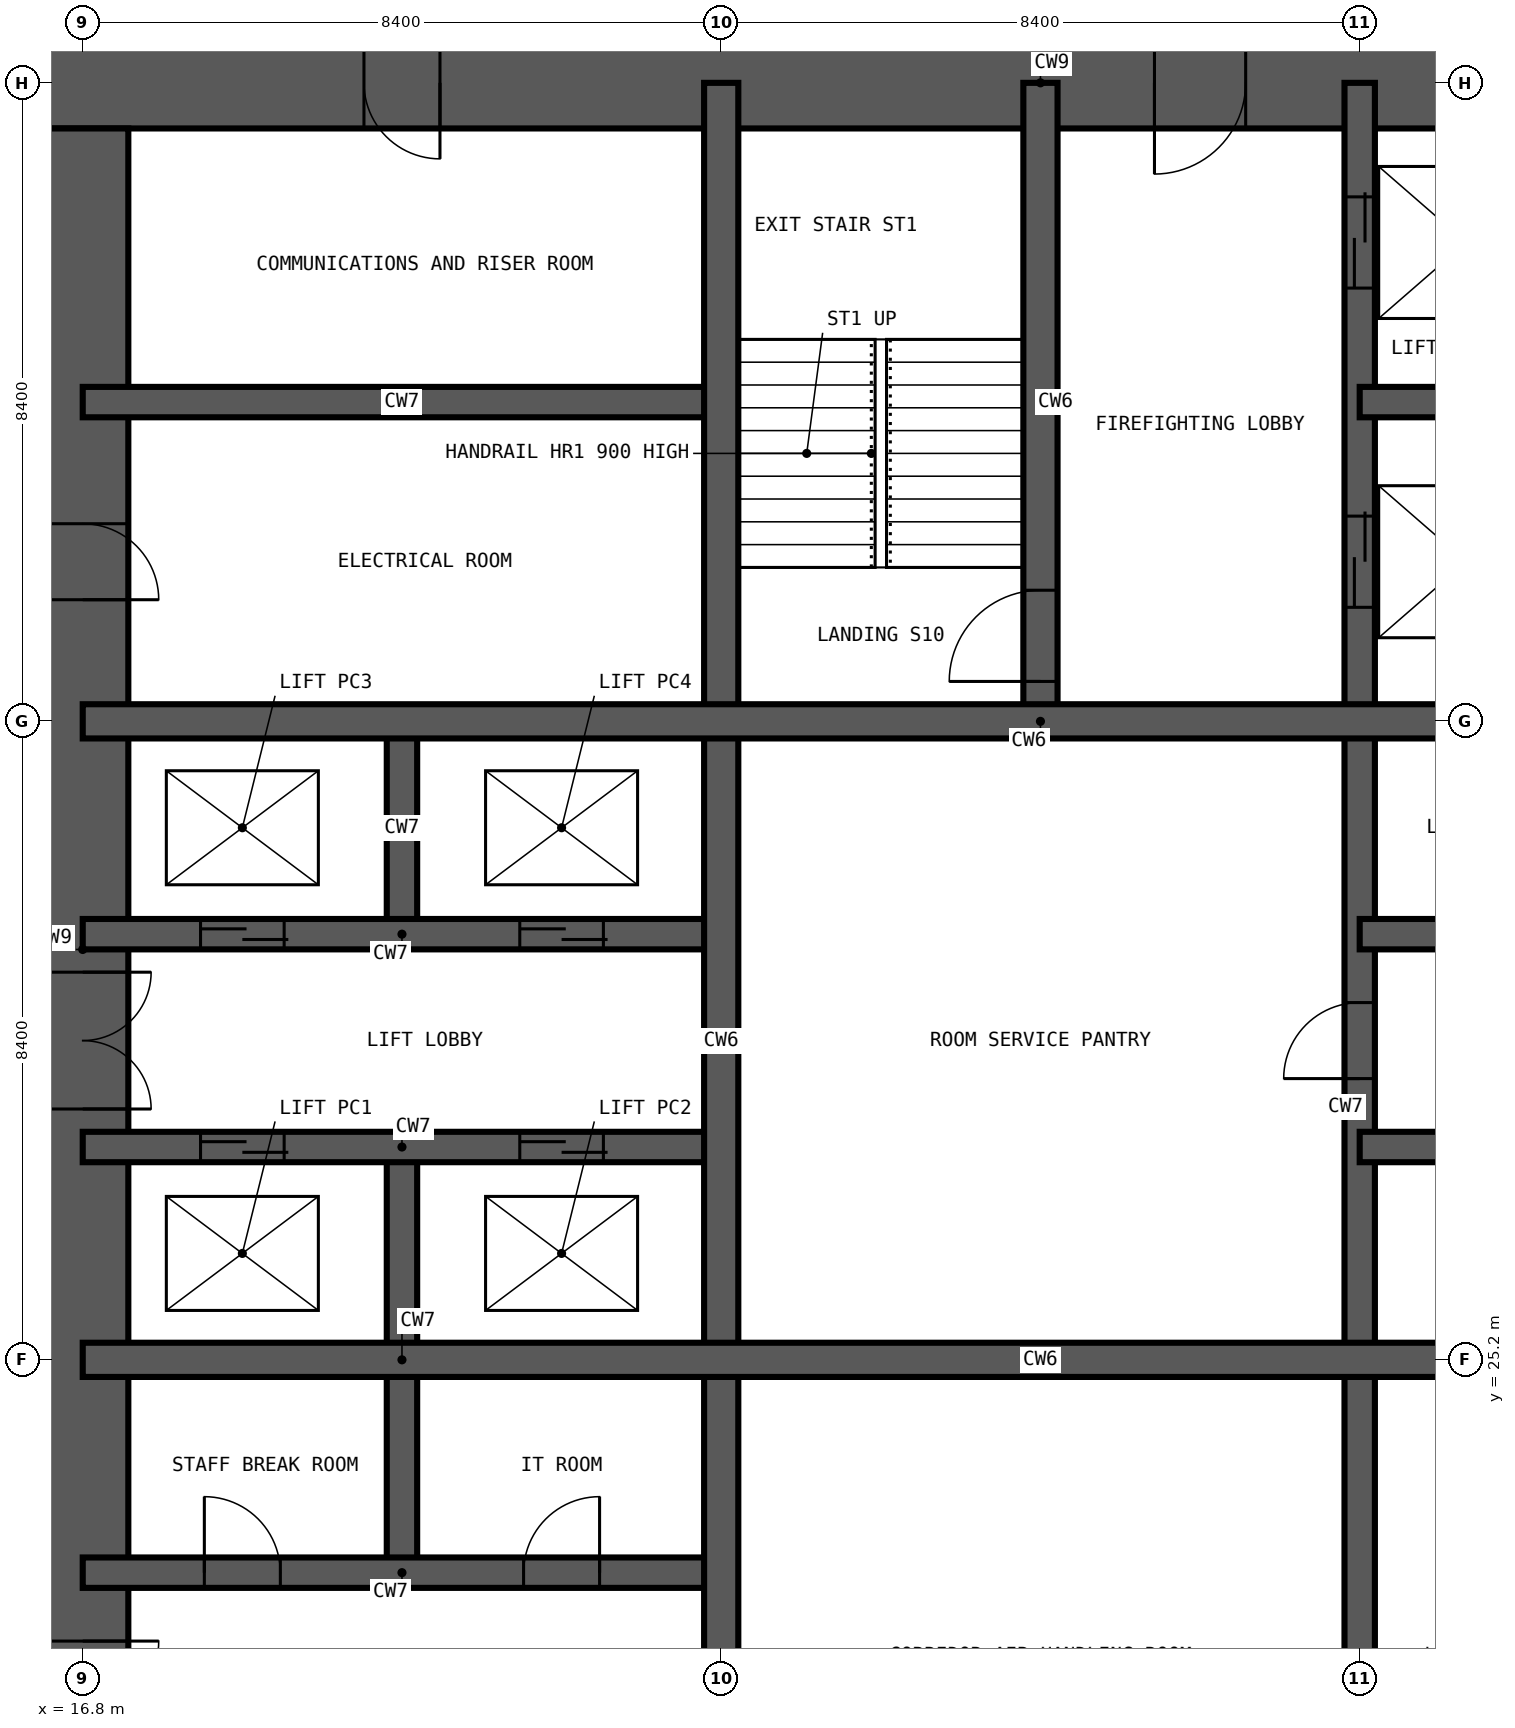
"""IFC4 building model, lengths in metres.
Left out: names, types, materials, properties, quantities, classifications, styles, units other than length and angle.
Written with IfcOpenShell. Run it as: python <this file> out.ifc"""

import sys

from ifc_helpers import new_model, si_unit, direction, frame, frame_2d, origin, place, context, subcontext, project, spatial, rectangle, extrude, element, fill, save


model = new_model("IFC4")
c1 = context("Model", 3, precision=1e-05, world=origin(), true_north=direction((0.0, 1.0)))
c2 = subcontext(c1, "Body", "Model", "MODEL_VIEW")
j1 = project(units=[si_unit("LENGTHUNIT", "METRE"), si_unit("PLANEANGLEUNIT", "RADIAN")], contexts=[c1])
p1 = place(None, origin())
s1 = spatial("IfcSite", under=j1, at=p1, CompositionType="ELEMENT")
p2 = place(p1, origin())
s2 = spatial("IfcBuilding", under=s1, at=p2, CompositionType="ELEMENT")
p3 = place(p2, frame((0.0, 0.0, 216.6)))
s3 = spatial("IfcBuildingStorey", under=s2, at=p3, CompositionType="ELEMENT", Elevation=216.6)
p4 = place(p3, frame((42.6, 42.0, -0.35), z_axis=(0.0, 0.0, 1.0), x_axis=(-1.0, 0.0, 0.0)))
e1 = element("IfcWall", 1, at=p4, inside=s3, PredefinedType="SHEAR", context=c2, shape_type="SweptSolid", body=[
    extrude(rectangle(XDim=26.4, YDim=1.2, at=frame_2d((13.2, 0.0))), origin(), (0.0, 0.0, 1.0), 3.55),
])
p5 = place(p4, frame((21.1, 0.0, 0.35)))
e2 = element("IfcOpeningElement", 2, at=p5, cuts=e1, PredefinedType="OPENING", context=c2, shape_type="SweptSolid", body=[
    extrude(rectangle(XDim=1.0, YDim=2.1, at=frame_2d((0.5, 1.05))), frame((0.0, 0.61, 0.0), z_axis=(0.0, -1.0, 0.0), x_axis=(1.0, 0.0, 0.0)), (0.0, 0.0, 1.0), 1.22),
])
p6 = place(p4, frame((10.5, 0.0, 0.35)))
e3 = element("IfcOpeningElement", 3, at=p6, cuts=e1, PredefinedType="OPENING", context=c2, shape_type="SweptSolid", body=[
    extrude(rectangle(XDim=1.2, YDim=2.2, at=frame_2d((0.6, 1.1))), frame((0.0, 0.61, 0.0), z_axis=(0.0, -1.0, 0.0), x_axis=(1.0, 0.0, 0.0)), (0.0, 0.0, 1.0), 1.22),
])
p7 = place(p3, frame((16.8, 41.4, -0.35), z_axis=(0.0, 0.0, 1.0), x_axis=(0.0, -1.0, 0.0)))
e4 = element("IfcWall", 4, at=p7, inside=s3, PredefinedType="SHEAR", context=c2, shape_type="SweptSolid", body=[
    extrude(rectangle(XDim=24.0, YDim=1.2, at=frame_2d((12.0, 0.0))), origin(), (0.0, 0.0, 1.0), 3.55),
])
p8 = place(p7, frame((11.1, 0.0, 0.35)))
e5 = element("IfcOpeningElement", 5, at=p8, cuts=e4, PredefinedType="OPENING", context=c2, shape_type="SweptSolid", body=[
    extrude(rectangle(XDim=1.8, YDim=2.2, at=frame_2d((0.9, 1.1))), frame((0.0, 0.61, 0.0), z_axis=(0.0, -1.0, 0.0), x_axis=(1.0, 0.0, 0.0)), (0.0, 0.0, 1.0), 1.22),
])
p9 = place(p7, frame((19.9, 0.0, 0.35)))
e6 = element("IfcOpeningElement", 6, at=p9, cuts=e4, PredefinedType="OPENING", context=c2, shape_type="SweptSolid", body=[
    extrude(rectangle(XDim=1.0, YDim=2.1, at=frame_2d((0.5, 1.05))), frame((0.0, 0.61, 0.0), z_axis=(0.0, -1.0, 0.0), x_axis=(1.0, 0.0, 0.0)), (0.0, 0.0, 1.0), 1.22),
])
p10 = place(p7, frame((5.2, 0.0, 0.35)))
e7 = element("IfcOpeningElement", 7, at=p10, cuts=e4, PredefinedType="OPENING", context=c2, shape_type="SweptSolid", body=[
    extrude(rectangle(XDim=1.0, YDim=2.1, at=frame_2d((0.5, 1.05))), frame((0.0, 0.61, 0.0), z_axis=(0.0, -1.0, 0.0), x_axis=(1.0, 0.0, 0.0)), (0.0, 0.0, 1.0), 1.22),
])
p11 = place(p3, frame((21.0, 22.4, -0.35), z_axis=(0.0, 0.0, 1.0), x_axis=(0.0, 1.0, 0.0)))
e8 = element("IfcWall", 8, at=p11, inside=s3, PredefinedType="SHEAR", context=c2, shape_type="SweptSolid", body=[
    extrude(rectangle(XDim=5.6, YDim=0.4, at=frame_2d((2.8, 0.0))), origin(), (0.0, 0.0, 1.0), 3.55),
])
p12 = place(p3, frame((21.0, 30.8, -0.35), z_axis=(0.0, 0.0, 1.0), x_axis=(0.0, 1.0, 0.0)))
e9 = element("IfcWall", 9, at=p12, inside=s3, PredefinedType="SHEAR", context=c2, shape_type="SweptSolid", body=[
    extrude(rectangle(XDim=2.8, YDim=0.4, at=frame_2d((1.4, 0.0))), origin(), (0.0, 0.0, 1.0), 3.55),
])
p13 = place(p3, frame((33.6, 16.8, -0.35), z_axis=(0.0, 0.0, 1.0), x_axis=(0.0, 1.0, 0.0)))
e10 = element("IfcWall", 10, at=p13, inside=s3, PredefinedType="SHEAR", context=c2, shape_type="SweptSolid", body=[
    extrude(rectangle(XDim=25.2, YDim=0.4, at=frame_2d((12.6, 0.0))), origin(), (0.0, 0.0, 1.0), 3.55),
])
p14 = place(p13, frame((22.5, 0.0, 0.35)))
e11 = element("IfcOpeningElement", 11, at=p14, cuts=e10, PredefinedType="OPENING", context=c2, shape_type="SweptSolid", body=[
    extrude(rectangle(XDim=1.2, YDim=2.2, at=frame_2d((0.6, 1.1))), frame((0.0, 0.21, 0.0), z_axis=(0.0, -1.0, 0.0), x_axis=(1.0, 0.0, 0.0)), (0.0, 0.0, 1.0), 0.42),
])
p15 = place(p13, frame((18.3, 0.0, 0.35)))
e12 = element("IfcOpeningElement", 12, at=p15, cuts=e10, PredefinedType="OPENING", context=c2, shape_type="SweptSolid", body=[
    extrude(rectangle(XDim=1.2, YDim=2.2, at=frame_2d((0.6, 1.1))), frame((0.0, 0.21, 0.0), z_axis=(0.0, -1.0, 0.0), x_axis=(1.0, 0.0, 0.0)), (0.0, 0.0, 1.0), 0.42),
])
p16 = place(p13, frame((12.1, 0.0, 0.35)))
e13 = element("IfcOpeningElement", 13, at=p16, cuts=e10, PredefinedType="OPENING", context=c2, shape_type="SweptSolid", body=[
    extrude(rectangle(XDim=1.0, YDim=2.1, at=frame_2d((0.5, 1.05))), frame((0.0, 0.21, 0.0), z_axis=(0.0, -1.0, 0.0), x_axis=(1.0, 0.0, 0.0)), (0.0, 0.0, 1.0), 0.42),
])
p17 = place(p3, frame((16.8, 22.4, -0.35), z_axis=(0.0, 0.0, 1.0), x_axis=(1.0, 0.0, 0.0)))
e14 = element("IfcWall", 14, at=p17, inside=s3, PredefinedType="SHEAR", context=c2, shape_type="SweptSolid", body=[
    extrude(rectangle(XDim=8.4, YDim=0.4, at=frame_2d((4.2, 0.0))), origin(), (0.0, 0.0, 1.0), 3.55),
])
p18 = place(p17, frame((1.6, 0.0, 0.35)))
e15 = element("IfcOpeningElement", 15, at=p18, cuts=e14, PredefinedType="OPENING", context=c2, shape_type="SweptSolid", body=[
    extrude(rectangle(XDim=1.0, YDim=2.1, at=frame_2d((0.5, 1.05))), frame((0.0, 0.21, 0.0), z_axis=(0.0, -1.0, 0.0), x_axis=(1.0, 0.0, 0.0)), (0.0, 0.0, 1.0), 0.42),
])
p19 = place(p17, frame((5.8, 0.0, 0.35)))
e16 = element("IfcOpeningElement", 16, at=p19, cuts=e14, PredefinedType="OPENING", context=c2, shape_type="SweptSolid", body=[
    extrude(rectangle(XDim=1.0, YDim=2.1, at=frame_2d((0.5, 1.05))), frame((0.0, 0.21, 0.0), z_axis=(0.0, -1.0, 0.0), x_axis=(1.0, 0.0, 0.0)), (0.0, 0.0, 1.0), 0.42),
])
p20 = place(p3, frame((16.8, 28.0, -0.35), z_axis=(0.0, 0.0, 1.0), x_axis=(1.0, 0.0, 0.0)))
e17 = element("IfcWall", 17, at=p20, inside=s3, PredefinedType="SHEAR", context=c2, shape_type="SweptSolid", body=[
    extrude(rectangle(XDim=8.4, YDim=0.4, at=frame_2d((4.2, 0.0))), origin(), (0.0, 0.0, 1.0), 3.55),
])
p21 = place(p20, frame((1.55, 0.0, 0.35)))
e18 = element("IfcOpeningElement", 18, at=p21, cuts=e17, PredefinedType="OPENING", context=c2, shape_type="SweptSolid", body=[
    extrude(rectangle(XDim=1.1, YDim=2.2, at=frame_2d((0.55, 1.1))), frame((0.0, 0.21, 0.0), z_axis=(0.0, -1.0, 0.0), x_axis=(1.0, 0.0, 0.0)), (0.0, 0.0, 1.0), 0.42),
])
p22 = place(p20, frame((5.75, 0.0, 0.35)))
e19 = element("IfcOpeningElement", 19, at=p22, cuts=e17, PredefinedType="OPENING", context=c2, shape_type="SweptSolid", body=[
    extrude(rectangle(XDim=1.1, YDim=2.2, at=frame_2d((0.55, 1.1))), frame((0.0, 0.21, 0.0), z_axis=(0.0, -1.0, 0.0), x_axis=(1.0, 0.0, 0.0)), (0.0, 0.0, 1.0), 0.42),
])
p23 = place(p3, frame((33.6, 28.0, -0.35), z_axis=(0.0, 0.0, 1.0), x_axis=(1.0, 0.0, 0.0)))
e20 = element("IfcWall", 20, at=p23, inside=s3, PredefinedType="SHEAR", context=c2, shape_type="SweptSolid", body=[
    extrude(rectangle(XDim=8.4, YDim=0.4, at=frame_2d((4.2, 0.0))), origin(), (0.0, 0.0, 1.0), 3.55),
])
p24 = place(p23, frame((1.6, 0.0, 0.35)))
e21 = element("IfcOpeningElement", 21, at=p24, cuts=e20, PredefinedType="OPENING", context=c2, shape_type="SweptSolid", body=[
    extrude(rectangle(XDim=1.0, YDim=2.1, at=frame_2d((0.5, 1.05))), frame((0.0, 0.21, 0.0), z_axis=(0.0, -1.0, 0.0), x_axis=(1.0, 0.0, 0.0)), (0.0, 0.0, 1.0), 0.42),
])
p25 = place(p23, frame((4.6, 0.0, 0.35)))
e22 = element("IfcOpeningElement", 22, at=p25, cuts=e20, PredefinedType="OPENING", context=c2, shape_type="SweptSolid", body=[
    extrude(rectangle(XDim=1.0, YDim=2.1, at=frame_2d((0.5, 1.05))), frame((0.0, 0.21, 0.0), z_axis=(0.0, -1.0, 0.0), x_axis=(1.0, 0.0, 0.0)), (0.0, 0.0, 1.0), 0.42),
])
p26 = place(p3, frame((16.8, 30.8, -0.35), z_axis=(0.0, 0.0, 1.0), x_axis=(1.0, 0.0, 0.0)))
e23 = element("IfcWall", 23, at=p26, inside=s3, PredefinedType="SHEAR", context=c2, shape_type="SweptSolid", body=[
    extrude(rectangle(XDim=8.4, YDim=0.4, at=frame_2d((4.2, 0.0))), origin(), (0.0, 0.0, 1.0), 3.55),
])
p27 = place(p26, frame((1.55, 0.0, 0.35)))
e24 = element("IfcOpeningElement", 24, at=p27, cuts=e23, PredefinedType="OPENING", context=c2, shape_type="SweptSolid", body=[
    extrude(rectangle(XDim=1.1, YDim=2.2, at=frame_2d((0.55, 1.1))), frame((0.0, 0.21, 0.0), z_axis=(0.0, -1.0, 0.0), x_axis=(1.0, 0.0, 0.0)), (0.0, 0.0, 1.0), 0.42),
])
p28 = place(p26, frame((5.75, 0.0, 0.35)))
e25 = element("IfcOpeningElement", 25, at=p28, cuts=e23, PredefinedType="OPENING", context=c2, shape_type="SweptSolid", body=[
    extrude(rectangle(XDim=1.1, YDim=2.2, at=frame_2d((0.55, 1.1))), frame((0.0, 0.21, 0.0), z_axis=(0.0, -1.0, 0.0), x_axis=(1.0, 0.0, 0.0)), (0.0, 0.0, 1.0), 0.42),
])
for number, where, z_axis, x_axis in (
    (26, (33.6, 30.8, -0.35), (0.0, 0.0, 1.0), (1.0, 0.0, 0.0)),
    (27, (16.8, 37.8, -0.35), (0.0, 0.0, 1.0), (1.0, 0.0, 0.0)),
):
    element("IfcWall", number, at=place(p3, frame(where, z_axis=z_axis, x_axis=x_axis)), inside=s3, PredefinedType="SHEAR", context=c2, shape_type="SweptSolid", body=[
        extrude(rectangle(XDim=8.4, YDim=0.4, at=frame_2d((4.2, 0.0))), origin(), (0.0, 0.0, 1.0), 3.55),
    ])
p29 = place(p3, frame((33.6, 37.8, -0.35), z_axis=(0.0, 0.0, 1.0), x_axis=(1.0, 0.0, 0.0)))
e28 = element("IfcWall", 28, at=p29, inside=s3, PredefinedType="SHEAR", context=c2, shape_type="SweptSolid", body=[
    extrude(rectangle(XDim=2.8, YDim=0.4, at=frame_2d((1.4, 0.0))), origin(), (0.0, 0.0, 1.0), 3.55),
])
p30 = place(p3, frame((25.2, 16.8, -0.35), z_axis=(0.0, 0.0, 1.0), x_axis=(0.0, 1.0, 0.0)))
e29 = element("IfcWall", 29, at=p30, inside=s3, PredefinedType="SHEAR", context=c2, shape_type="SweptSolid", body=[
    extrude(rectangle(XDim=25.2, YDim=0.45, at=frame_2d((12.6, 0.0))), origin(), (0.0, 0.0, 1.0), 3.55),
])
p31 = place(p3, frame((29.4, 33.6, -0.35), z_axis=(0.0, 0.0, 1.0), x_axis=(0.0, 1.0, 0.0)))
e30 = element("IfcWall", 30, at=p31, inside=s3, PredefinedType="SHEAR", context=c2, shape_type="SweptSolid", body=[
    extrude(rectangle(XDim=8.4, YDim=0.45, at=frame_2d((4.2, 0.0))), origin(), (0.0, 0.0, 1.0), 3.55),
])
p32 = place(p31, frame((0.525, 0.0, 0.35)))
e31 = element("IfcOpeningElement", 31, at=p32, cuts=e30, PredefinedType="OPENING", context=c2, shape_type="SweptSolid", body=[
    extrude(rectangle(XDim=1.2, YDim=2.2, at=frame_2d((0.6, 1.1))), frame((0.0, 0.235, 0.0), z_axis=(0.0, -1.0, 0.0), x_axis=(1.0, 0.0, 0.0)), (0.0, 0.0, 1.0), 0.47),
])
for number, where, z_axis, x_axis in (
    (32, (16.8, 25.2, -0.35), (0.0, 0.0, 1.0), (1.0, 0.0, 0.0)),
    (33, (16.8, 33.6, -0.35), (0.0, 0.0, 1.0), (1.0, 0.0, 0.0)),
):
    element("IfcWall", number, at=place(p3, frame(where, z_axis=z_axis, x_axis=x_axis)), inside=s3, PredefinedType="SHEAR", context=c2, shape_type="SweptSolid", body=[
        extrude(rectangle(XDim=25.2, YDim=0.45, at=frame_2d((12.6, 0.0))), origin(), (0.0, 0.0, 1.0), 3.55),
    ])
p33 = place(p32, origin())
e34 = element("IfcDoor", 34, at=p33, inside=s3, OperationType="SINGLE_SWING_LEFT", PredefinedType="DOOR", context=c2, shape_type="SweptSolid", body=[
    extrude(rectangle(XDim=1.2, YDim=2.2, at=frame_2d((0.6, 1.1))), frame((0.0, 0.025, 0.0), z_axis=(0.0, -1.0, 0.0), x_axis=(1.0, 0.0, 0.0)), (0.0, 0.0, 1.0), 0.05),
])
fill(e31, e34)
p34 = place(p21, origin())
e35 = element("IfcDoor", 35, at=p34, inside=s3, OperationType="DOUBLE_DOOR_SLIDING", PredefinedType="DOOR", context=c2, shape_type="SweptSolid", body=[
    extrude(rectangle(XDim=1.1, YDim=2.2, at=frame_2d((0.55, 1.1))), frame((0.0, 0.025, 0.0), z_axis=(0.0, -1.0, 0.0), x_axis=(1.0, 0.0, 0.0)), (0.0, 0.0, 1.0), 0.05),
])
fill(e18, e35)
p35 = place(p22, origin())
e36 = element("IfcDoor", 36, at=p35, inside=s3, OperationType="DOUBLE_DOOR_SLIDING", PredefinedType="DOOR", context=c2, shape_type="SweptSolid", body=[
    extrude(rectangle(XDim=1.1, YDim=2.2, at=frame_2d((0.55, 1.1))), frame((0.0, 0.025, 0.0), z_axis=(0.0, -1.0, 0.0), x_axis=(1.0, 0.0, 0.0)), (0.0, 0.0, 1.0), 0.05),
])
fill(e19, e36)
p36 = place(p27, origin())
e37 = element("IfcDoor", 37, at=p36, inside=s3, OperationType="DOUBLE_DOOR_SLIDING", PredefinedType="DOOR", context=c2, shape_type="SweptSolid", body=[
    extrude(rectangle(XDim=1.1, YDim=2.2, at=frame_2d((0.55, 1.1))), frame((0.0, 0.025, 0.0), z_axis=(0.0, -1.0, 0.0), x_axis=(1.0, 0.0, 0.0)), (0.0, 0.0, 1.0), 0.05),
])
fill(e24, e37)
p37 = place(p28, origin())
e38 = element("IfcDoor", 38, at=p37, inside=s3, OperationType="DOUBLE_DOOR_SLIDING", PredefinedType="DOOR", context=c2, shape_type="SweptSolid", body=[
    extrude(rectangle(XDim=1.1, YDim=2.2, at=frame_2d((0.55, 1.1))), frame((0.0, 0.025, 0.0), z_axis=(0.0, -1.0, 0.0), x_axis=(1.0, 0.0, 0.0)), (0.0, 0.0, 1.0), 0.05),
])
fill(e25, e38)
p38 = place(p14, origin())
e39 = element("IfcDoor", 39, at=p38, inside=s3, OperationType="DOUBLE_DOOR_SLIDING", PredefinedType="DOOR", context=c2, shape_type="SweptSolid", body=[
    extrude(rectangle(XDim=1.2, YDim=2.2, at=frame_2d((0.6, 1.1))), frame((0.0, 0.025, 0.0), z_axis=(0.0, -1.0, 0.0), x_axis=(1.0, 0.0, 0.0)), (0.0, 0.0, 1.0), 0.05),
])
fill(e11, e39)
p39 = place(p15, origin())
e40 = element("IfcDoor", 40, at=p39, inside=s3, OperationType="DOUBLE_DOOR_SLIDING", PredefinedType="DOOR", context=c2, shape_type="SweptSolid", body=[
    extrude(rectangle(XDim=1.2, YDim=2.2, at=frame_2d((0.6, 1.1))), frame((0.0, 0.025, 0.0), z_axis=(0.0, -1.0, 0.0), x_axis=(1.0, 0.0, 0.0)), (0.0, 0.0, 1.0), 0.05),
])
fill(e12, e40)
p40 = place(p8, origin())
e41 = element("IfcDoor", 41, at=p40, inside=s3, OperationType="DOUBLE_DOOR_DOUBLE_SWING", PredefinedType="DOOR", context=c2, shape_type="SweptSolid", body=[
    extrude(rectangle(XDim=1.8, YDim=2.2, at=frame_2d((0.9, 1.1))), frame((0.0, 0.025, 0.0), z_axis=(0.0, -1.0, 0.0), x_axis=(1.0, 0.0, 0.0)), (0.0, 0.0, 1.0), 0.05),
])
fill(e5, e41)
p41 = place(p18, origin())
e42 = element("IfcDoor", 42, at=p41, inside=s3, OperationType="SINGLE_SWING_LEFT", PredefinedType="DOOR", context=c2, shape_type="SweptSolid", body=[
    extrude(rectangle(XDim=1.0, YDim=2.1, at=frame_2d((0.5, 1.05))), frame((0.0, 0.025, 0.0), z_axis=(0.0, -1.0, 0.0), x_axis=(1.0, 0.0, 0.0)), (0.0, 0.0, 1.0), 0.05),
])
fill(e15, e42)
p42 = place(p19, origin())
e43 = element("IfcDoor", 43, at=p42, inside=s3, OperationType="SINGLE_SWING_RIGHT", PredefinedType="DOOR", context=c2, shape_type="SweptSolid", body=[
    extrude(rectangle(XDim=1.0, YDim=2.1, at=frame_2d((0.5, 1.05))), frame((0.0, 0.025, 0.0), z_axis=(0.0, -1.0, 0.0), x_axis=(1.0, 0.0, 0.0)), (0.0, 0.0, 1.0), 0.05),
])
fill(e16, e43)
p43 = place(p9, origin())
e44 = element("IfcDoor", 44, at=p43, inside=s3, OperationType="SINGLE_SWING_LEFT", PredefinedType="DOOR", context=c2, shape_type="SweptSolid", body=[
    extrude(rectangle(XDim=1.0, YDim=2.1, at=frame_2d((0.5, 1.05))), frame((0.0, 0.025, 0.0), z_axis=(0.0, -1.0, 0.0), x_axis=(1.0, 0.0, 0.0)), (0.0, 0.0, 1.0), 0.05),
])
fill(e6, e44)
p44 = place(p10, origin())
e45 = element("IfcDoor", 45, at=p44, inside=s3, OperationType="SINGLE_SWING_RIGHT", PredefinedType="DOOR", context=c2, shape_type="SweptSolid", body=[
    extrude(rectangle(XDim=1.0, YDim=2.1, at=frame_2d((0.5, 1.05))), frame((0.0, 0.025, 0.0), z_axis=(0.0, -1.0, 0.0), x_axis=(1.0, 0.0, 0.0)), (0.0, 0.0, 1.0), 0.05),
])
fill(e7, e45)
p45 = place(p5, origin())
e46 = element("IfcDoor", 46, at=p45, inside=s3, OperationType="SINGLE_SWING_LEFT", PredefinedType="DOOR", context=c2, shape_type="SweptSolid", body=[
    extrude(rectangle(XDim=1.0, YDim=2.1, at=frame_2d((0.5, 1.05))), frame((0.0, 0.025, 0.0), z_axis=(0.0, -1.0, 0.0), x_axis=(1.0, 0.0, 0.0)), (0.0, 0.0, 1.0), 0.05),
])
fill(e2, e46)
p46 = place(p16, origin())
e47 = element("IfcDoor", 47, at=p46, inside=s3, OperationType="SINGLE_SWING_LEFT", PredefinedType="DOOR", context=c2, shape_type="SweptSolid", body=[
    extrude(rectangle(XDim=1.0, YDim=2.1, at=frame_2d((0.5, 1.05))), frame((0.0, 0.025, 0.0), z_axis=(0.0, -1.0, 0.0), x_axis=(1.0, 0.0, 0.0)), (0.0, 0.0, 1.0), 0.05),
])
fill(e13, e47)
p47 = place(p6, origin())
e48 = element("IfcDoor", 48, at=p47, inside=s3, OperationType="SINGLE_SWING_RIGHT", PredefinedType="DOOR", context=c2, shape_type="SweptSolid", body=[
    extrude(rectangle(XDim=1.2, YDim=2.2, at=frame_2d((0.6, 1.1))), frame((0.0, 0.025, 0.0), z_axis=(0.0, -1.0, 0.0), x_axis=(1.0, 0.0, 0.0)), (0.0, 0.0, 1.0), 0.05),
])
fill(e3, e48)
save(model, sys.argv[1])
